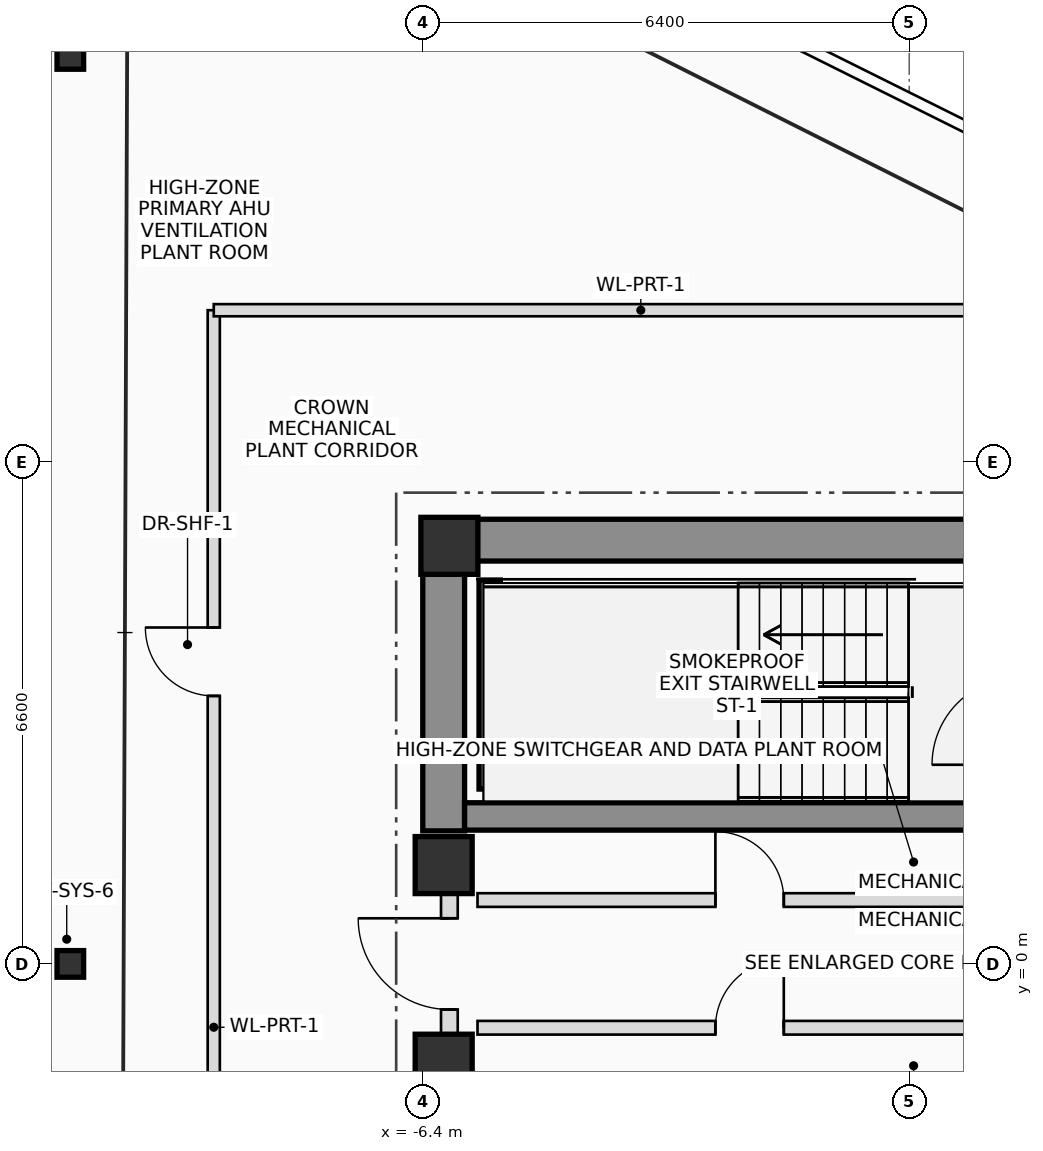
"""IFC4 building model, lengths in metres.
Left out: names, types, materials, properties, quantities, classifications, styles, units other than length and angle.
Written with IfcOpenShell. Run it as: python <this file> out.ifc"""

import sys

from ifc_helpers import new_model, si_unit, direction, frame, frame_2d, origin, origin_2d, place, context, subcontext, project, spatial, rectangle, i_section, extrude, source, transform, mapped, element, fill, save


model = new_model("IFC4")
c1 = context("Model", 3, precision=1e-05, world=origin(), true_north=direction((0.0, 1.0)))
c2 = subcontext(c1, "Body", "Model", "MODEL_VIEW")
j1 = project(units=[si_unit("LENGTHUNIT", "METRE"), si_unit("PLANEANGLEUNIT", "RADIAN")], contexts=[c1])
p1 = place(None, origin())
s1 = spatial("IfcSite", under=j1, at=p1, CompositionType="ELEMENT")
p2 = place(p1, origin())
s2 = spatial("IfcBuilding", under=s1, at=p2, CompositionType="ELEMENT")
p3 = place(p2, frame((0.0, 0.0, 317.45)))
s3 = spatial("IfcBuildingStorey", under=s2, at=p3, CompositionType="ELEMENT", Elevation=317.45)
m1 = source(origin(), c2, "Body", "SweptSolid", [
    extrude(rectangle(XDim=0.75, YDim=0.75, at=origin_2d()), origin(), (0.0, 0.0, 1.0), 5.4),
])
p4 = place(p3, frame((-6.05, 5.5, 0.0), z_axis=(0.0, 0.0, 1.0), x_axis=(1.0, 0.0, 0.0)))
e1 = element("IfcColumn", 1, at=p4, inside=s3, PredefinedType="COLUMN", context=c2, shape_type="MappedRepresentation", body=[
    mapped(m1, transform((0.0, 0.0, 0.0), scale=1.0)),
])
p5 = place(p3, frame((-6.4, 5.575, 0.0), z_axis=(0.0, 0.0, 1.0), x_axis=(1.0, 0.0, 0.0)))
e2 = element("IfcWall", 2, at=p5, inside=s3, PredefinedType="SHEAR", context=c2, shape_type="SweptSolid", body=[
    extrude(rectangle(XDim=12.8, YDim=0.55, at=frame_2d((6.4, 0.0))), origin(), (0.0, 0.0, 1.0), 5.4),
])
p6 = place(p5, frame((8.6, 0.0, 0.0)))
e3 = element("IfcOpeningElement", 3, at=p6, cuts=e2, PredefinedType="OPENING", context=c2, shape_type="SweptSolid", body=[
    extrude(rectangle(XDim=1.2, YDim=2.2, at=frame_2d((0.6, 1.1))), frame((0.0, 0.285, 0.0), z_axis=(0.0, -1.0, 0.0), x_axis=(1.0, 0.0, 0.0)), (0.0, 0.0, 1.0), 0.57),
])
p7 = place(p3, frame((-6.125, 1.75, 0.0), z_axis=(0.0, 0.0, 1.0), x_axis=(0.0, 1.0, 0.0)))
e4 = element("IfcWall", 4, at=p7, inside=s3, PredefinedType="SHEAR", context=c2, shape_type="SweptSolid", body=[
    extrude(rectangle(XDim=3.55, YDim=0.55, at=frame_2d((1.775, 0.0))), origin(), (0.0, 0.0, 1.0), 5.4),
])
p8 = place(p3, frame((-5.85, 1.94, 0.0), z_axis=(0.0, 0.0, 1.0), x_axis=(1.0, 0.0, 0.0)))
e5 = element("IfcWall", 5, at=p8, inside=s3, PredefinedType="SHEAR", context=c2, shape_type="SweptSolid", body=[
    extrude(rectangle(XDim=11.7, YDim=0.36, at=frame_2d((5.85, 0.0))), origin(), (0.0, 0.0, 1.0), 5.4),
])
p9 = place(p3, frame((-5.52, 2.3, 0.0), z_axis=(0.0, 0.0, 1.0), x_axis=(0.0, 1.0, 0.0)))
e6 = element("IfcWall", 6, at=p9, inside=s3, PredefinedType="SHEAR", context=c2, shape_type="SweptSolid", body=[
    extrude(rectangle(XDim=2.75, YDim=0.28, at=frame_2d((1.375, 0.0))), origin(), (0.0, 0.0, 1.0), 5.4),
])
for number, where, z_axis, x_axis in (
    (7, (-6.125, -1.3, 0.0), (0.0, 0.0, 1.0), (1.0, 0.0, 0.0)),
    (8, (-6.125, 1.3, 0.0), (0.0, 0.0, 1.0), (1.0, 0.0, 0.0)),
):
    element("IfcColumn", number, at=place(p3, frame(where, z_axis=z_axis, x_axis=x_axis)), inside=s3, PredefinedType="COLUMN", context=c2, shape_type="MappedRepresentation", body=[
        mapped(m1, transform((0.0, 0.0, 0.0), scale=1.0)),
    ])
m2 = source(origin(), c2, "Body", "SweptSolid", [
    extrude(i_section(OverallWidth=0.35, OverallDepth=0.35, WebThickness=0.012, FlangeThickness=0.019, FilletRadius=0.016, at=origin_2d()), origin(), (0.0, 0.0, 1.0), 5.4),
])
for number, where, z_axis, x_axis in (
    (9, (-11.037, 11.945, 0.0), (0.0, 0.0, 1.0), (1.0, 0.0, 0.0)),
    (10, (-11.037, 0.0, 0.0), (0.0, 0.0, 1.0), (1.0, 0.0, 0.0)),
):
    element("IfcColumn", number, at=place(p3, frame(where, z_axis=z_axis, x_axis=x_axis)), inside=s3, PredefinedType="COLUMN", context=c2, shape_type="MappedRepresentation", body=[
        mapped(m2, transform((0.0, 0.0, 0.0), scale=1.0)),
    ])
p10 = place(p3, frame((-6.05, -0.95, 0.0), z_axis=(0.0, 0.0, 1.0), x_axis=(0.0, 1.0, 0.0)))
e11 = element("IfcWall", 11, at=p10, inside=s3, PredefinedType="PLUMBINGWALL", context=c2, shape_type="SweptSolid", body=[
    extrude(rectangle(XDim=1.9, YDim=0.22, at=frame_2d((0.95, 0.0))), origin(), (0.0, 0.0, 1.0), 4.1),
])
p11 = place(p10, frame((0.35, 0.0, 0.0)))
e12 = element("IfcOpeningElement", 12, at=p11, cuts=e11, PredefinedType="OPENING", context=c2, shape_type="SweptSolid", body=[
    extrude(rectangle(XDim=1.2, YDim=2.2, at=frame_2d((0.6, 1.1))), frame((0.0, 0.12, 0.0), z_axis=(0.0, -1.0, 0.0), x_axis=(1.0, 0.0, 0.0)), (0.0, 0.0, 1.0), 0.24),
])
p12 = place(p3, frame((-5.68, 0.84, 0.0), z_axis=(0.0, 0.0, 1.0), x_axis=(1.0, 0.0, 0.0)))
e13 = element("IfcWall", 13, at=p12, inside=s3, PredefinedType="PLUMBINGWALL", context=c2, shape_type="SweptSolid", body=[
    extrude(rectangle(XDim=11.33, YDim=0.18, at=frame_2d((5.665, 0.0))), origin(), (0.0, 0.0, 1.0), 5.12),
])
p13 = place(p12, frame((3.13, 0.0, 0.0)))
e14 = element("IfcOpeningElement", 14, at=p13, cuts=e13, PredefinedType="OPENING", context=c2, shape_type="SweptSolid", body=[
    extrude(rectangle(XDim=0.9, YDim=2.05, at=frame_2d((0.45, 1.025))), frame((0.0, 0.1, 0.0), z_axis=(0.0, -1.0, 0.0), x_axis=(1.0, 0.0, 0.0)), (0.0, 0.0, 1.0), 0.2),
])
p14 = place(p3, frame((-5.68, -0.84, 0.0), z_axis=(0.0, 0.0, 1.0), x_axis=(1.0, 0.0, 0.0)))
e15 = element("IfcWall", 15, at=p14, inside=s3, PredefinedType="PLUMBINGWALL", context=c2, shape_type="SweptSolid", body=[
    extrude(rectangle(XDim=10.22, YDim=0.18, at=frame_2d((5.11, 0.0))), origin(), (0.0, 0.0, 1.0), 5.12),
])
p15 = place(p14, frame((3.13, 0.0, 0.0)))
e16 = element("IfcOpeningElement", 16, at=p15, cuts=e15, PredefinedType="OPENING", context=c2, shape_type="SweptSolid", body=[
    extrude(rectangle(XDim=0.9, YDim=2.05, at=frame_2d((0.45, 1.025))), frame((0.0, 0.1, 0.0), z_axis=(0.0, -1.0, 0.0), x_axis=(1.0, 0.0, 0.0)), (0.0, 0.0, 1.0), 0.2),
])
p16 = place(p14, frame((9.02, 0.0, 0.0)))
e17 = element("IfcOpeningElement", 17, at=p16, cuts=e15, PredefinedType="OPENING", context=c2, shape_type="SweptSolid", body=[
    extrude(rectangle(XDim=0.9, YDim=2.05, at=frame_2d((0.45, 1.025))), frame((0.0, 0.1, 0.0), z_axis=(0.0, -1.0, 0.0), x_axis=(1.0, 0.0, 0.0)), (0.0, 0.0, 1.0), 0.2),
])
p17 = place(p3, frame((-9.15, -5.042, 0.0), z_axis=(0.0, 0.0, 1.0), x_axis=(0.0, 1.0, 0.0)))
e18 = element("IfcWall", 18, at=p17, inside=s3, PredefinedType="PARTITIONING", context=c2, shape_type="SweptSolid", body=[
    extrude(rectangle(XDim=13.643, YDim=0.16, at=frame_2d((6.821, 0.0))), origin(), (0.0, 0.0, 1.0), 5.12),
])
p18 = place(p17, frame((8.568, 0.0, 0.0)))
e19 = element("IfcOpeningElement", 19, at=p18, cuts=e18, PredefinedType="OPENING", context=c2, shape_type="SweptSolid", body=[
    extrude(rectangle(XDim=0.9, YDim=2.05, at=frame_2d((0.45, 1.025))), frame((0.0, 0.09, 0.0), z_axis=(0.0, -1.0, 0.0), x_axis=(1.0, 0.0, 0.0)), (0.0, 0.0, 1.0), 0.18),
])
p19 = place(p3, frame((-9.15, 8.6, 0.0), z_axis=(0.0, 0.0, 1.0), x_axis=(1.0, 0.0, 0.0)))
e20 = element("IfcWall", 20, at=p19, inside=s3, PredefinedType="PARTITIONING", context=c2, shape_type="SweptSolid", body=[
    extrude(rectangle(XDim=11.237, YDim=0.16, at=frame_2d((5.619, 0.0))), origin(), (0.0, 0.0, 1.0), 5.12),
])
p20 = place(p11, origin())
e21 = element("IfcDoor", 21, at=p20, inside=s3, OperationType="SINGLE_SWING_RIGHT", PredefinedType="DOOR", context=c2, shape_type="SweptSolid", body=[
    extrude(rectangle(XDim=1.2, YDim=2.2, at=frame_2d((0.6, 1.1))), frame((0.0, 0.025, 0.0), z_axis=(0.0, -1.0, 0.0), x_axis=(1.0, 0.0, 0.0)), (0.0, 0.0, 1.0), 0.05),
])
fill(e12, e21)
p21 = place(p13, origin())
e22 = element("IfcDoor", 22, at=p21, inside=s3, OperationType="SINGLE_SWING_LEFT", PredefinedType="DOOR", context=c2, shape_type="SweptSolid", body=[
    extrude(rectangle(XDim=0.9, YDim=2.05, at=frame_2d((0.45, 1.025))), frame((0.0, 0.025, 0.0), z_axis=(0.0, -1.0, 0.0), x_axis=(1.0, 0.0, 0.0)), (0.0, 0.0, 1.0), 0.05),
])
fill(e14, e22)
p22 = place(p15, origin())
e23 = element("IfcDoor", 23, at=p22, inside=s3, OperationType="SINGLE_SWING_RIGHT", PredefinedType="DOOR", context=c2, shape_type="SweptSolid", body=[
    extrude(rectangle(XDim=0.9, YDim=2.05, at=frame_2d((0.45, 1.025))), frame((0.0, 0.025, 0.0), z_axis=(0.0, -1.0, 0.0), x_axis=(1.0, 0.0, 0.0)), (0.0, 0.0, 1.0), 0.05),
])
fill(e16, e23)
p23 = place(p18, origin())
e24 = element("IfcDoor", 24, at=p23, inside=s3, OperationType="SINGLE_SWING_RIGHT", PredefinedType="DOOR", context=c2, shape_type="SweptSolid", body=[
    extrude(rectangle(XDim=0.9, YDim=2.05, at=frame_2d((0.45, 1.025))), frame((0.0, 0.025, 0.0), z_axis=(0.0, -1.0, 0.0), x_axis=(1.0, 0.0, 0.0)), (0.0, 0.0, 1.0), 0.05),
])
fill(e19, e24)
save(model, sys.argv[1])
